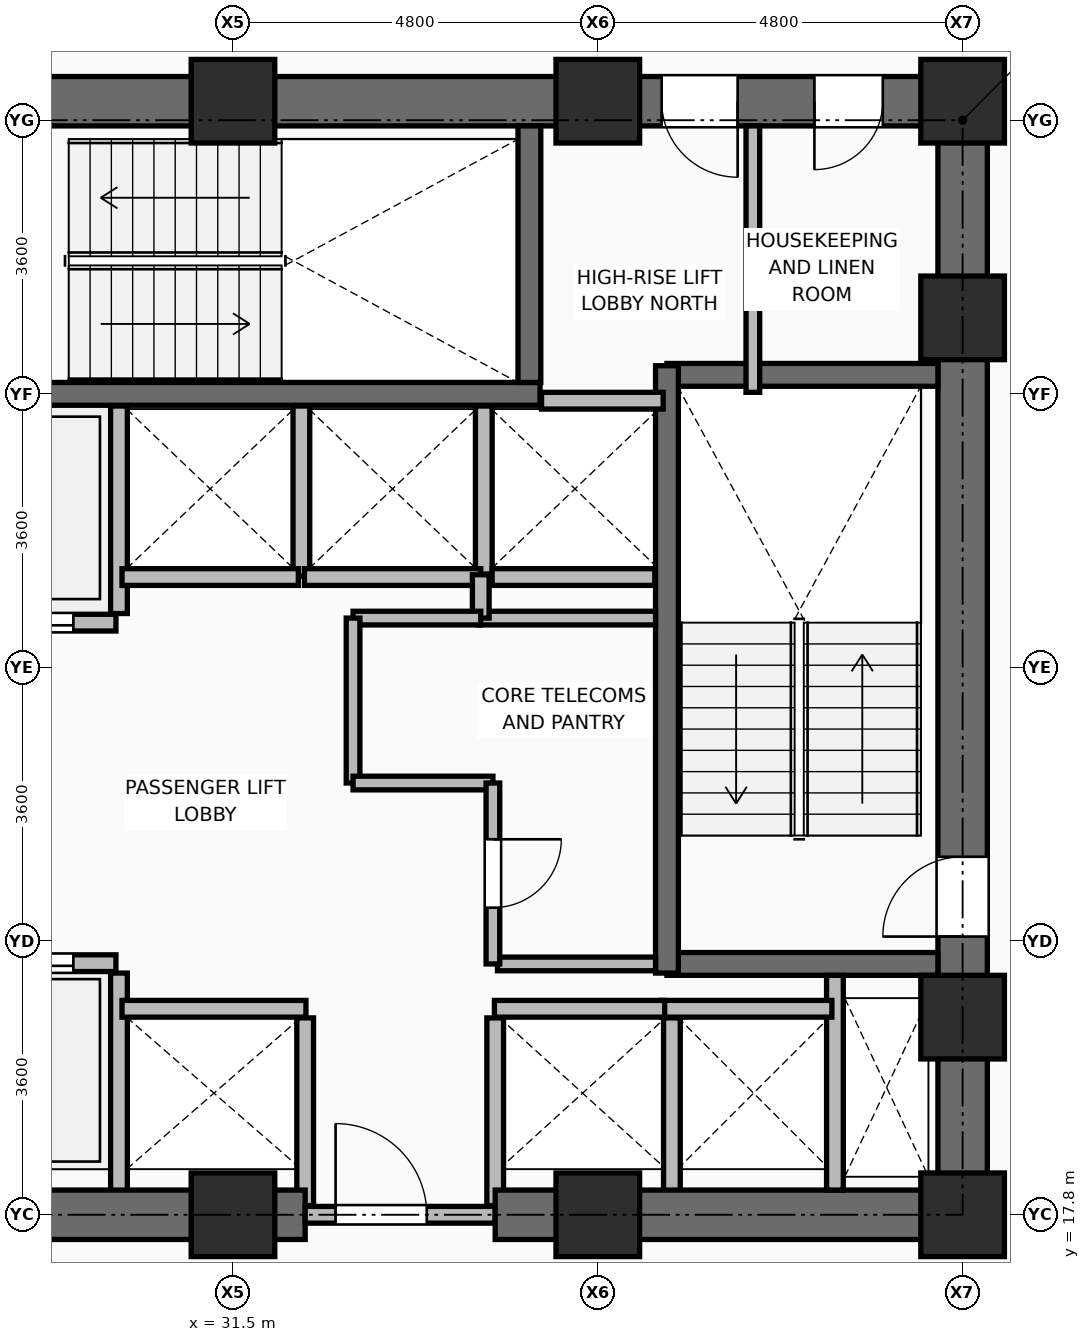
"""IFC4 building model, lengths in metres.
Left out: names, types, materials, properties, quantities, classifications, styles, units other than length and angle.
Written with IfcOpenShell. Run it as: python <this file> out.ifc"""

import sys

from ifc_helpers import new_model, si_unit, direction, frame, frame_2d, origin, origin_2d, place, context, subcontext, project, spatial, rectangle, extrude, element, fill, save


model = new_model("IFC4")
c1 = context("Model", 3, precision=1e-05, world=origin(), true_north=direction((0.0, 1.0)))
c2 = subcontext(c1, "Body", "Model", "MODEL_VIEW")
j1 = project(units=[si_unit("LENGTHUNIT", "METRE"), si_unit("PLANEANGLEUNIT", "RADIAN")], contexts=[c1])
p1 = place(None, origin())
s1 = spatial("IfcSite", under=j1, at=p1, CompositionType="ELEMENT")
p2 = place(p1, origin())
s2 = spatial("IfcBuilding", under=s1, at=p2, CompositionType="ELEMENT")
p3 = place(p2, frame((0.0, 0.0, 83.25)))
s3 = spatial("IfcBuildingStorey", under=s2, at=p3, CompositionType="ELEMENT", Elevation=83.25)
for number, where, z_axis, x_axis in (
    (1, (31.5, 17.8, 0.0), (0.0, 0.0, 1.0), (1.0, 0.0, 0.0)),
    (2, (36.3, 17.8, 0.0), (0.0, 0.0, 1.0), (1.0, 0.0, 0.0)),
    (3, (41.1, 17.8, 0.0), (0.0, 0.0, 1.0), (1.0, 0.0, 0.0)),
    (4, (41.1, 20.4, 0.0), (0.0, 0.0, 1.0), (1.0, 0.0, 0.0)),
    (5, (41.1, 29.6, 0.0), (0.0, 0.0, 1.0), (1.0, 0.0, 0.0)),
    (6, (31.5, 32.45, 0.0), (0.0, 0.0, 1.0), (1.0, 0.0, 0.0)),
    (7, (36.3, 32.45, 0.0), (0.0, 0.0, 1.0), (1.0, 0.0, 0.0)),
    (8, (41.1, 32.45, 0.0), (0.0, 0.0, 1.0), (1.0, 0.0, 0.0)),
):
    element("IfcColumn", number, at=place(p3, frame(where, z_axis=z_axis, x_axis=x_axis)), inside=s3, PredefinedType="COLUMN", context=c2, shape_type="SweptSolid", body=[
        extrude(rectangle(XDim=1.1, YDim=1.1, at=origin_2d()), origin(), (0.0, 0.0, 1.0), 3.75),
    ])
p4 = place(p3, frame((30.0, 18.08, 0.0), z_axis=(0.0, 0.0, 1.0), x_axis=(0.0, 1.0, 0.0)))
e9 = element("IfcWall", 9, at=p4, inside=s3, PredefinedType="PARTITIONING", context=c2, shape_type="SweptSolid", body=[
    extrude(rectangle(XDim=2.9, YDim=0.22, at=frame_2d((1.45, 0.0))), origin(), (0.0, 0.0, 1.0), 3.545),
])
for number, where, z_axis, x_axis in (
    (10, (32.45, 17.92, 0.0), (0.0, 0.0, 1.0), (0.0, 1.0, 0.0)),
    (11, (34.95, 17.92, 0.0), (0.0, 0.0, 1.0), (0.0, 1.0, 0.0)),
):
    element("IfcWall", number, at=place(p3, frame(where, z_axis=z_axis, x_axis=x_axis)), inside=s3, PredefinedType="PARTITIONING", context=c2, shape_type="SweptSolid", body=[
        extrude(rectangle(XDim=2.47, YDim=0.22, at=frame_2d((1.235, 0.0))), origin(), (0.0, 0.0, 1.0), 2.928),
    ])
p5 = place(p3, frame((37.275, 18.08, 0.0), z_axis=(0.0, 0.0, 1.0), x_axis=(0.0, 1.0, 0.0)))
e12 = element("IfcWall", 12, at=p5, inside=s3, PredefinedType="PARTITIONING", context=c2, shape_type="SweptSolid", body=[
    extrude(rectangle(XDim=2.31, YDim=0.22, at=frame_2d((1.155, 0.0))), origin(), (0.0, 0.0, 1.0), 3.545),
])
p6 = place(p3, frame((30.0, 25.71, 0.0), z_axis=(0.0, 0.0, 1.0), x_axis=(0.0, 1.0, 0.0)))
e13 = element("IfcWall", 13, at=p6, inside=s3, PredefinedType="PARTITIONING", context=c2, shape_type="SweptSolid", body=[
    extrude(rectangle(XDim=2.73, YDim=0.22, at=frame_2d((1.365, 0.0))), origin(), (0.0, 0.0, 1.0), 3.545),
])
p7 = place(p3, frame((32.4, 26.2, 0.0), z_axis=(0.0, 0.0, 1.0), x_axis=(0.0, 1.0, 0.0)))
e14 = element("IfcWall", 14, at=p7, inside=s3, PredefinedType="PARTITIONING", context=c2, shape_type="SweptSolid", body=[
    extrude(rectangle(XDim=2.24, YDim=0.22, at=frame_2d((1.12, 0.0))), origin(), (0.0, 0.0, 1.0), 3.545),
])
p8 = place(p3, frame((34.8, 26.23, 0.0), z_axis=(0.0, 0.0, 1.0), x_axis=(0.0, 1.0, 0.0)))
e15 = element("IfcWall", 15, at=p8, inside=s3, PredefinedType="PARTITIONING", context=c2, shape_type="SweptSolid", body=[
    extrude(rectangle(XDim=2.21, YDim=0.22, at=frame_2d((1.105, 0.0))), origin(), (0.0, 0.0, 1.0), 3.545),
])
p9 = place(p3, frame((34.91, 26.19, 0.0), z_axis=(0.0, 0.0, 1.0), x_axis=(1.0, 0.0, 0.0)))
e16 = element("IfcWall", 16, at=p9, inside=s3, PredefinedType="PARTITIONING", context=c2, shape_type="SweptSolid", body=[
    extrude(rectangle(XDim=2.14, YDim=0.22, at=frame_2d((1.07, 0.0))), origin(), (0.0, 0.0, 1.0), 3.545),
])
p10 = place(p3, frame((25.55, 17.8, 0.0), z_axis=(0.0, 0.0, 1.0), x_axis=(1.0, 0.0, 0.0)))
e17 = element("IfcWall", 17, at=p10, inside=s3, PredefinedType="SHEAR", context=c2, shape_type="SweptSolid", body=[
    extrude(rectangle(XDim=6.9, YDim=0.65, at=frame_2d((3.45, 0.0))), origin(), (0.0, 0.0, 1.0), 3.57),
])
p11 = place(p3, frame((32.45, 17.8, 0.0), z_axis=(0.0, 0.0, 1.0), x_axis=(1.0, 0.0, 0.0)))
e18 = element("IfcWall", 18, at=p11, inside=s3, PredefinedType="PARTITIONING", context=c2, shape_type="SweptSolid", body=[
    extrude(rectangle(XDim=2.5, YDim=0.22, at=frame_2d((1.25, 0.0))), origin(), (0.0, 0.0, 1.0), 2.928),
])
p12 = place(p11, frame((0.4, 0.0, 0.0)))
e19 = element("IfcOpeningElement", 19, at=p12, cuts=e18, PredefinedType="OPENING", context=c2, shape_type="SweptSolid", body=[
    extrude(rectangle(XDim=1.2, YDim=2.1, at=frame_2d((0.6, 1.05))), frame((0.0, 0.12, 0.0), z_axis=(0.0, -1.0, 0.0), x_axis=(1.0, 0.0, 0.0)), (0.0, 0.0, 1.0), 0.24),
])
p13 = place(p3, frame((34.95, 17.8, 0.0), z_axis=(0.0, 0.0, 1.0), x_axis=(1.0, 0.0, 0.0)))
e20 = element("IfcWall", 20, at=p13, inside=s3, PredefinedType="SHEAR", context=c2, shape_type="SweptSolid", body=[
    extrude(rectangle(XDim=6.475, YDim=0.65, at=frame_2d((3.238, 0.0))), origin(), (0.0, 0.0, 1.0), 3.57),
])
p14 = place(p3, frame((21.575, 32.45, 0.0), z_axis=(0.0, 0.0, 1.0), x_axis=(1.0, 0.0, 0.0)))
e21 = element("IfcWall", 21, at=p14, inside=s3, PredefinedType="SHEAR", context=c2, shape_type="SweptSolid", body=[
    extrude(rectangle(XDim=19.85, YDim=0.65, at=frame_2d((9.925, 0.0))), origin(), (0.0, 0.0, 1.0), 3.57),
])
p15 = place(p14, frame((2.175, 0.0, 0.0)))
e22 = element("IfcOpeningElement", 22, at=p15, cuts=e21, PredefinedType="OPENING", context=c2, shape_type="SweptSolid", body=[
    extrude(rectangle(XDim=1.1, YDim=2.1, at=frame_2d((0.55, 1.05))), frame((0.0, 0.335, 0.0), z_axis=(0.0, -1.0, 0.0), x_axis=(1.0, 0.0, 0.0)), (0.0, 0.0, 1.0), 0.67),
])
p16 = place(p14, frame((15.565, 0.0, 0.0)))
e23 = element("IfcOpeningElement", 23, at=p16, cuts=e21, PredefinedType="OPENING", context=c2, shape_type="SweptSolid", body=[
    extrude(rectangle(XDim=1.0, YDim=2.1, at=frame_2d((0.5, 1.05))), frame((0.0, 0.335, 0.0), z_axis=(0.0, -1.0, 0.0), x_axis=(1.0, 0.0, 0.0)), (0.0, 0.0, 1.0), 0.67),
])
p17 = place(p14, frame((17.575, 0.0, 0.0)))
e24 = element("IfcOpeningElement", 24, at=p17, cuts=e21, PredefinedType="OPENING", context=c2, shape_type="SweptSolid", body=[
    extrude(rectangle(XDim=0.9, YDim=2.1, at=frame_2d((0.45, 1.05))), frame((0.0, 0.335, 0.0), z_axis=(0.0, -1.0, 0.0), x_axis=(1.0, 0.0, 0.0)), (0.0, 0.0, 1.0), 0.67),
])
p18 = place(p3, frame((41.1, 18.125, 0.0), z_axis=(0.0, 0.0, 1.0), x_axis=(0.0, 1.0, 0.0)))
e25 = element("IfcWall", 25, at=p18, inside=s3, PredefinedType="SHEAR", context=c2, shape_type="SweptSolid", body=[
    extrude(rectangle(XDim=14.0, YDim=0.65, at=frame_2d((7.0, 0.0))), origin(), (0.0, 0.0, 1.0), 3.57),
])
p19 = place(p18, frame((3.335, 0.0, 0.0)))
e26 = element("IfcOpeningElement", 26, at=p19, cuts=e25, PredefinedType="OPENING", context=c2, shape_type="SweptSolid", body=[
    extrude(rectangle(XDim=1.05, YDim=2.1, at=frame_2d((0.525, 1.05))), frame((0.0, 0.335, 0.0), z_axis=(0.0, -1.0, 0.0), x_axis=(1.0, 0.0, 0.0)), (0.0, 0.0, 1.0), 0.67),
])
for number, where, z_axis, x_axis in (
    (27, (37.21, 21.1, 0.0), (0.0, 0.0, 1.0), (1.0, 0.0, 0.0)),
    (28, (37.21, 28.85, 0.0), (0.0, 0.0, 1.0), (1.0, 0.0, 0.0)),
):
    element("IfcWall", number, at=place(p3, frame(where, z_axis=z_axis, x_axis=x_axis)), inside=s3, PredefinedType="SHEAR", context=c2, shape_type="SweptSolid", body=[
        extrude(rectangle(XDim=3.565, YDim=0.3, at=frame_2d((1.782, 0.0))), origin(), (0.0, 0.0, 1.0), 3.57),
    ])
p20 = place(p3, frame((37.21, 20.98, 0.0), z_axis=(0.0, 0.0, 1.0), x_axis=(0.0, 1.0, 0.0)))
e29 = element("IfcWall", 29, at=p20, inside=s3, PredefinedType="SHEAR", context=c2, shape_type="SweptSolid", body=[
    extrude(rectangle(XDim=7.99, YDim=0.3, at=frame_2d((3.995, 0.0))), origin(), (0.0, 0.0, 1.0), 3.57),
])
p21 = place(p3, frame((27.51, 28.6, 0.0), z_axis=(0.0, 0.0, 1.0), x_axis=(1.0, 0.0, 0.0)))
e30 = element("IfcWall", 30, at=p21, inside=s3, PredefinedType="SHEAR", context=c2, shape_type="SweptSolid", body=[
    extrude(rectangle(XDim=8.03, YDim=0.3, at=frame_2d((4.015, 0.0))), origin(), (0.0, 0.0, 1.0), 3.57),
])
p22 = place(p3, frame((35.4, 28.75, 0.0), z_axis=(0.0, 0.0, 1.0), x_axis=(0.0, 1.0, 0.0)))
e31 = element("IfcWall", 31, at=p22, inside=s3, PredefinedType="SHEAR", context=c2, shape_type="SweptSolid", body=[
    extrude(rectangle(XDim=3.375, YDim=0.3, at=frame_2d((1.688, 0.0))), origin(), (0.0, 0.0, 1.0), 3.57),
])
p23 = place(p3, frame((39.42, 18.125, 0.0), z_axis=(0.0, 0.0, 1.0), x_axis=(0.0, 1.0, 0.0)))
e32 = element("IfcWall", 32, at=p23, inside=s3, PredefinedType="PARTITIONING", context=c2, shape_type="SweptSolid", body=[
    extrude(rectangle(XDim=2.825, YDim=0.22, at=frame_2d((1.413, 0.0))), origin(), (0.0, 0.0, 1.0), 3.55),
])
p24 = place(p3, frame((27.74, 21.11, 0.0), z_axis=(0.0, 0.0, 1.0), x_axis=(1.0, 0.0, 0.0)))
e33 = element("IfcWall", 33, at=p24, inside=s3, PredefinedType="PARTITIONING", context=c2, shape_type="SweptSolid", body=[
    extrude(rectangle(XDim=2.22, YDim=0.22, at=frame_2d((1.11, 0.0))), origin(), (0.0, 0.0, 1.0), 3.55),
])
p25 = place(p24, frame((0.56, 0.0, 0.0)))
e34 = element("IfcOpeningElement", 34, at=p25, cuts=e33, PredefinedType="OPENING", context=c2, shape_type="SweptSolid", body=[
    extrude(rectangle(XDim=1.1, YDim=2.2, at=frame_2d((0.55, 1.1))), frame((0.0, 0.12, 0.0), z_axis=(0.0, -1.0, 0.0), x_axis=(1.0, 0.0, 0.0)), (0.0, 0.0, 1.0), 0.24),
])
p26 = place(p3, frame((27.74, 25.59, 0.0), z_axis=(0.0, 0.0, 1.0), x_axis=(1.0, 0.0, 0.0)))
e35 = element("IfcWall", 35, at=p26, inside=s3, PredefinedType="PARTITIONING", context=c2, shape_type="SweptSolid", body=[
    extrude(rectangle(XDim=2.22, YDim=0.22, at=frame_2d((1.11, 0.0))), origin(), (0.0, 0.0, 1.0), 3.55),
])
p27 = place(p26, frame((0.56, 0.0, 0.0)))
e36 = element("IfcOpeningElement", 36, at=p27, cuts=e35, PredefinedType="OPENING", context=c2, shape_type="SweptSolid", body=[
    extrude(rectangle(XDim=1.1, YDim=2.2, at=frame_2d((0.55, 1.1))), frame((0.0, 0.12, 0.0), z_axis=(0.0, -1.0, 0.0), x_axis=(1.0, 0.0, 0.0)), (0.0, 0.0, 1.0), 0.24),
])
p28 = place(p3, frame((30.04, 20.51, 0.0), z_axis=(0.0, 0.0, 1.0), x_axis=(1.0, 0.0, 0.0)))
e37 = element("IfcWall", 37, at=p28, inside=s3, PredefinedType="PARTITIONING", context=c2, shape_type="SweptSolid", body=[
    extrude(rectangle(XDim=2.42, YDim=0.22, at=frame_2d((1.21, 0.0))), origin(), (0.0, 0.0, 1.0), 3.55),
])
for number, where, z_axis, x_axis in (
    (38, (37.14, 20.51, 0.0), (0.0, 0.0, 1.0), (1.0, 0.0, 0.0)),
    (39, (34.94, 20.51, 0.0), (0.0, 0.0, 1.0), (1.0, 0.0, 0.0)),
):
    element("IfcWall", number, at=place(p3, frame(where, z_axis=z_axis, x_axis=x_axis)), inside=s3, PredefinedType="PARTITIONING", context=c2, shape_type="SweptSolid", body=[
        extrude(rectangle(XDim=2.24, YDim=0.22, at=frame_2d((1.12, 0.0))), origin(), (0.0, 0.0, 1.0), 3.55),
    ])
for number, where, z_axis, x_axis in (
    (40, (30.04, 26.19, 0.0), (0.0, 0.0, 1.0), (1.0, 0.0, 0.0)),
    (41, (32.44, 26.19, 0.0), (0.0, 0.0, 1.0), (1.0, 0.0, 0.0)),
):
    element("IfcWall", number, at=place(p3, frame(where, z_axis=z_axis, x_axis=x_axis)), inside=s3, PredefinedType="PARTITIONING", context=c2, shape_type="SweptSolid", body=[
        extrude(rectangle(XDim=2.32, YDim=0.22, at=frame_2d((1.16, 0.0))), origin(), (0.0, 0.0, 1.0), 3.55),
    ])
p29 = place(p3, frame((35.56, 28.51, 0.0), z_axis=(0.0, 0.0, 1.0), x_axis=(1.0, 0.0, 0.0)))
e42 = element("IfcWall", 42, at=p29, inside=s3, PredefinedType="PARTITIONING", context=c2, shape_type="SweptSolid", body=[
    extrude(rectangle(XDim=1.6, YDim=0.22, at=frame_2d((0.8, 0.0))), origin(), (0.0, 0.0, 1.0), 3.55),
])
p30 = place(p3, frame((34.98, 21.1, 0.0), z_axis=(0.0, 0.0, 1.0), x_axis=(1.0, 0.0, 0.0)))
e43 = element("IfcWall", 43, at=p30, inside=s3, PredefinedType="PARTITIONING", context=c2, shape_type="SweptSolid", body=[
    extrude(rectangle(XDim=2.08, YDim=0.18, at=frame_2d((1.04, 0.0))), origin(), (0.0, 0.0, 1.0), 3.55),
])
p31 = place(p3, frame((34.72, 25.65, 0.0), z_axis=(0.0, 0.0, 1.0), x_axis=(1.0, 0.0, 0.0)))
e44 = element("IfcWall", 44, at=p31, inside=s3, PredefinedType="PARTITIONING", context=c2, shape_type="SweptSolid", body=[
    extrude(rectangle(XDim=2.34, YDim=0.18, at=frame_2d((1.17, 0.0))), origin(), (0.0, 0.0, 1.0), 3.55),
])
p32 = place(p3, frame((34.76, 25.65, 0.0), z_axis=(0.0, 0.0, 1.0), x_axis=(0.0, 1.0, 0.0)))
e45 = element("IfcWall", 45, at=p32, inside=s3, PredefinedType="PARTITIONING", context=c2, shape_type="SweptSolid", body=[
    extrude(rectangle(XDim=0.57, YDim=0.22, at=frame_2d((0.285, 0.0))), origin(), (0.0, 0.0, 1.0), 3.55),
])
p33 = place(p3, frame((33.08, 25.65, 0.0), z_axis=(0.0, 0.0, 1.0), x_axis=(1.0, 0.0, 0.0)))
e46 = element("IfcWall", 46, at=p33, inside=s3, PredefinedType="PARTITIONING", context=c2, shape_type="SweptSolid", body=[
    extrude(rectangle(XDim=1.68, YDim=0.18, at=frame_2d((0.84, 0.0))), origin(), (0.0, 0.0, 1.0), 3.55),
])
p34 = place(p3, frame((33.08, 23.48, 0.0), z_axis=(0.0, 0.0, 1.0), x_axis=(0.0, 1.0, 0.0)))
e47 = element("IfcWall", 47, at=p34, inside=s3, PredefinedType="PARTITIONING", context=c2, shape_type="SweptSolid", body=[
    extrude(rectangle(XDim=2.17, YDim=0.18, at=frame_2d((1.085, 0.0))), origin(), (0.0, 0.0, 1.0), 3.55),
])
p35 = place(p3, frame((33.08, 23.48, 0.0), z_axis=(0.0, 0.0, 1.0), x_axis=(1.0, 0.0, 0.0)))
e48 = element("IfcWall", 48, at=p35, inside=s3, PredefinedType="PARTITIONING", context=c2, shape_type="SweptSolid", body=[
    extrude(rectangle(XDim=1.84, YDim=0.18, at=frame_2d((0.92, 0.0))), origin(), (0.0, 0.0, 1.0), 3.55),
])
p36 = place(p3, frame((34.92, 21.1, 0.0), z_axis=(0.0, 0.0, 1.0), x_axis=(0.0, 1.0, 0.0)))
e49 = element("IfcWall", 49, at=p36, inside=s3, PredefinedType="PARTITIONING", context=c2, shape_type="SweptSolid", body=[
    extrude(rectangle(XDim=2.38, YDim=0.18, at=frame_2d((1.19, 0.0))), origin(), (0.0, 0.0, 1.0), 3.55),
])
p37 = place(p36, frame((0.74, 0.0, 0.0)))
e50 = element("IfcOpeningElement", 50, at=p37, cuts=e49, PredefinedType="OPENING", context=c2, shape_type="SweptSolid", body=[
    extrude(rectangle(XDim=0.9, YDim=2.1, at=frame_2d((0.45, 1.05))), frame((0.0, 0.1, 0.0), z_axis=(0.0, -1.0, 0.0), x_axis=(1.0, 0.0, 0.0)), (0.0, 0.0, 1.0), 0.2),
])
p38 = place(p3, frame((38.34, 28.62, 0.0), z_axis=(0.0, 0.0, 1.0), x_axis=(0.0, 1.0, 0.0)))
e51 = element("IfcWall", 51, at=p38, inside=s3, PredefinedType="PARTITIONING", context=c2, shape_type="SweptSolid", body=[
    extrude(rectangle(XDim=3.505, YDim=0.18, at=frame_2d((1.752, 0.0))), origin(), (0.0, 0.0, 1.0), 3.55),
])
p39 = place(p12, origin())
e52 = element("IfcDoor", 52, at=p39, inside=s3, OperationType="SINGLE_SWING_LEFT", PredefinedType="DOOR", context=c2, shape_type="SweptSolid", body=[
    extrude(rectangle(XDim=1.2, YDim=2.1, at=frame_2d((0.6, 1.05))), frame((0.0, 0.025, 0.0), z_axis=(0.0, -1.0, 0.0), x_axis=(1.0, 0.0, 0.0)), (0.0, 0.0, 1.0), 0.05),
])
fill(e19, e52)
p40 = place(p19, origin())
e53 = element("IfcDoor", 53, at=p40, inside=s3, OperationType="SINGLE_SWING_LEFT", PredefinedType="DOOR", context=c2, shape_type="SweptSolid", body=[
    extrude(rectangle(XDim=1.05, YDim=2.1, at=frame_2d((0.525, 1.05))), frame((0.0, 0.025, 0.0), z_axis=(0.0, -1.0, 0.0), x_axis=(1.0, 0.0, 0.0)), (0.0, 0.0, 1.0), 0.05),
])
fill(e26, e53)
p41 = place(p25, origin())
e54 = element("IfcDoor", 54, at=p41, inside=s3, OperationType="DOUBLE_DOOR_SLIDING", PredefinedType="DOOR", context=c2, shape_type="SweptSolid", body=[
    extrude(rectangle(XDim=1.1, YDim=2.2, at=frame_2d((0.55, 1.1))), frame((0.0, 0.025, 0.0), z_axis=(0.0, -1.0, 0.0), x_axis=(1.0, 0.0, 0.0)), (0.0, 0.0, 1.0), 0.05),
])
fill(e34, e54)
p42 = place(p27, frame((1.1, 0.0, 0.0), z_axis=(0.0, 0.0, 1.0), x_axis=(-1.0, 0.0, 0.0)))
e55 = element("IfcDoor", 55, at=p42, inside=s3, OperationType="DOUBLE_DOOR_SLIDING", PredefinedType="DOOR", context=c2, shape_type="SweptSolid", body=[
    extrude(rectangle(XDim=1.1, YDim=2.2, at=frame_2d((0.55, 1.1))), frame((0.0, 0.025, 0.0), z_axis=(0.0, -1.0, 0.0), x_axis=(1.0, 0.0, 0.0)), (0.0, 0.0, 1.0), 0.05),
])
fill(e36, e55)
p43 = place(p37, frame((0.9, 0.0, 0.0), z_axis=(0.0, 0.0, 1.0), x_axis=(-1.0, 0.0, 0.0)))
e56 = element("IfcDoor", 56, at=p43, inside=s3, OperationType="SINGLE_SWING_LEFT", PredefinedType="DOOR", context=c2, shape_type="SweptSolid", body=[
    extrude(rectangle(XDim=0.9, YDim=2.1, at=frame_2d((0.45, 1.05))), frame((0.0, 0.025, 0.0), z_axis=(0.0, -1.0, 0.0), x_axis=(1.0, 0.0, 0.0)), (0.0, 0.0, 1.0), 0.05),
])
fill(e50, e56)
p44 = place(p16, frame((1.0, 0.0, 0.0), z_axis=(0.0, 0.0, 1.0), x_axis=(-1.0, 0.0, 0.0)))
e57 = element("IfcDoor", 57, at=p44, inside=s3, OperationType="SINGLE_SWING_LEFT", PredefinedType="DOOR", context=c2, shape_type="SweptSolid", body=[
    extrude(rectangle(XDim=1.0, YDim=2.1, at=frame_2d((0.5, 1.05))), frame((0.0, 0.025, 0.0), z_axis=(0.0, -1.0, 0.0), x_axis=(1.0, 0.0, 0.0)), (0.0, 0.0, 1.0), 0.05),
])
fill(e23, e57)
p45 = place(p17, frame((0.9, 0.0, 0.0), z_axis=(0.0, 0.0, 1.0), x_axis=(-1.0, 0.0, 0.0)))
e58 = element("IfcDoor", 58, at=p45, inside=s3, OperationType="SINGLE_SWING_RIGHT", PredefinedType="DOOR", context=c2, shape_type="SweptSolid", body=[
    extrude(rectangle(XDim=0.9, YDim=2.1, at=frame_2d((0.45, 1.05))), frame((0.0, 0.025, 0.0), z_axis=(0.0, -1.0, 0.0), x_axis=(1.0, 0.0, 0.0)), (0.0, 0.0, 1.0), 0.05),
])
fill(e24, e58)
save(model, sys.argv[1])
